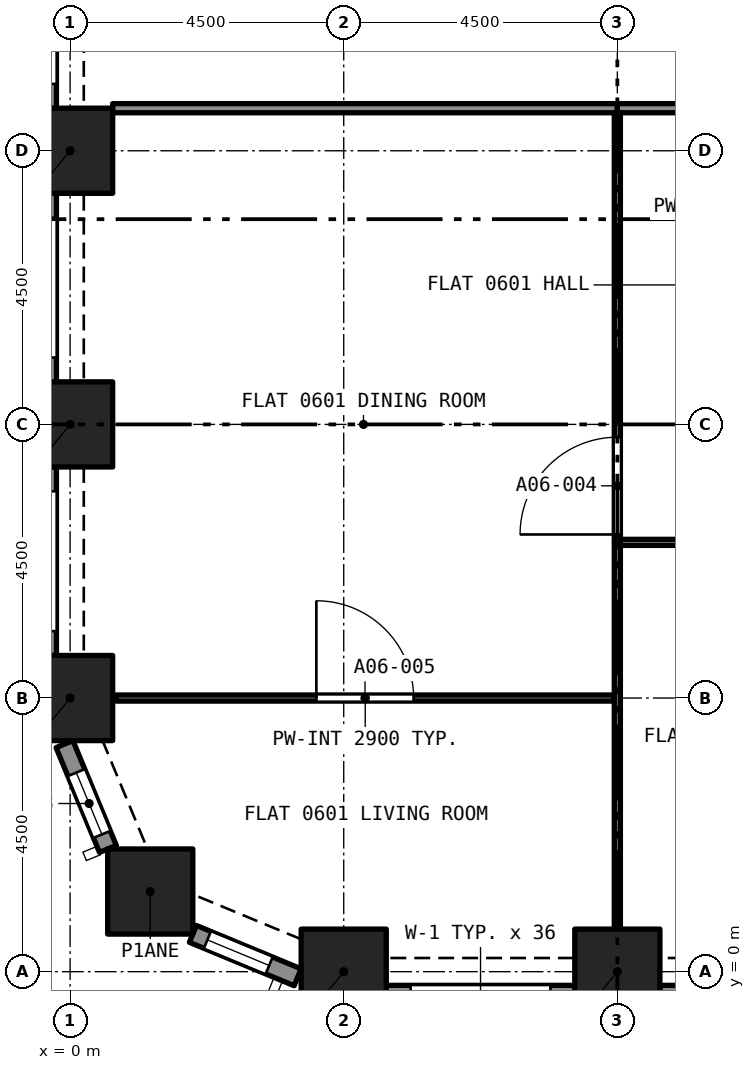
"""IFC4 building model, lengths in metres.
Left out: names, types, materials, properties, quantities, classifications, styles, units other than length and angle.
Written with IfcOpenShell. Run it as: python <this file> out.ifc"""

import sys

from ifc_helpers import new_model, si_unit, direction, frame, frame_2d, origin, origin_2d, place, context, subcontext, project, spatial, rectangle, extrude, element, fill, save


model = new_model("IFC4")
c1 = context("Model", 3, precision=1e-05, world=origin(), true_north=direction((0.0, 1.0)))
c2 = subcontext(c1, "Body", "Model", "MODEL_VIEW")
j1 = project(units=[si_unit("LENGTHUNIT", "METRE"), si_unit("PLANEANGLEUNIT", "RADIAN")], contexts=[c1])
p1 = place(None, origin())
s1 = spatial("IfcSite", under=j1, at=p1, CompositionType="ELEMENT")
p2 = place(p1, origin())
s2 = spatial("IfcBuilding", under=s1, at=p2, CompositionType="ELEMENT")
p3 = place(p2, frame((0.0, 0.0, 30.4)))
s3 = spatial("IfcBuildingStorey", under=s2, at=p3, CompositionType="ELEMENT", Elevation=30.4)
for number, where, z_axis, x_axis in (
    (1, (4.5, 0.0, 0.0), (0.0, 0.0, 1.0), (1.0, 0.0, 0.0)),
    (2, (9.0, 0.0, 0.0), (0.0, 0.0, 1.0), (1.0, 0.0, 0.0)),
    (3, (1.318, 1.318, 0.0), (0.0, 0.0, 1.0), (1.0, 0.0, 0.0)),
    (4, (0.0, 4.5, 0.0), (0.0, 0.0, 1.0), (1.0, 0.0, 0.0)),
    (5, (0.0, 9.0, 0.0), (0.0, 0.0, 1.0), (1.0, 0.0, 0.0)),
    (6, (0.0, 13.5, 0.0), (0.0, 0.0, 1.0), (1.0, 0.0, 0.0)),
):
    element("IfcColumn", number, at=place(p3, frame(where, z_axis=z_axis, x_axis=x_axis)), inside=s3, PredefinedType="COLUMN", context=c2, shape_type="SweptSolid", body=[
        extrude(rectangle(XDim=1.4, YDim=1.4, at=origin_2d()), origin(), (0.0, 0.0, 1.0), 3.2),
    ])
p4 = place(p3, frame((0.622, 2.02, 0.0), z_axis=(0.0, 0.0, 1.0), x_axis=(-0.38262540684, 0.923903565336, 0.0)))
e7 = element("IfcWall", 7, at=p4, inside=s3, PredefinedType="SOLIDWALL", context=c2, shape_type="SweptSolid", body=[
    extrude(rectangle(XDim=1.865, YDim=0.3, at=frame_2d((0.933, 0.0))), origin(), (0.0, 0.0, 1.0), 3.2),
])
p5 = place(p4, frame((0.258, 0.0, 0.45)))
e8 = element("IfcOpeningElement", 8, at=p5, cuts=e7, PredefinedType="OPENING", context=c2, shape_type="SweptSolid", body=[
    extrude(rectangle(XDim=1.1, YDim=1.95, at=frame_2d((0.55, 0.975))), frame((0.0, 0.16, 0.0), z_axis=(0.0, -1.0, 0.0), x_axis=(1.0, 0.0, 0.0)), (0.0, 0.0, 1.0), 0.32),
])
p6 = place(p3, frame((3.743, -0.092, 0.0), z_axis=(0.0, 0.0, 1.0), x_axis=(-0.923857286003, 0.382737135771, 0.0)))
e9 = element("IfcWall", 9, at=p6, inside=s3, PredefinedType="SOLIDWALL", context=c2, shape_type="SweptSolid", body=[
    extrude(rectangle(XDim=1.865, YDim=0.3, at=frame_2d((0.933, 0.0))), origin(), (0.0, 0.0, 1.0), 3.2),
])
p7 = place(p6, frame((0.508, 0.0, 0.45)))
e10 = element("IfcOpeningElement", 10, at=p7, cuts=e9, PredefinedType="OPENING", context=c2, shape_type="SweptSolid", body=[
    extrude(rectangle(XDim=1.1, YDim=1.95, at=frame_2d((0.55, 0.975))), frame((0.0, 0.16, 0.0), z_axis=(0.0, -1.0, 0.0), x_axis=(1.0, 0.0, 0.0)), (0.0, 0.0, 1.0), 0.32),
])
p8 = place(p3, frame((8.3, -0.375, 0.0), z_axis=(0.0, 0.0, 1.0), x_axis=(-1.0, 0.0, 0.0)))
e11 = element("IfcWall", 11, at=p8, inside=s3, PredefinedType="SOLIDWALL", context=c2, shape_type="SweptSolid", body=[
    extrude(rectangle(XDim=3.1, YDim=0.3, at=frame_2d((1.55, 0.0))), origin(), (0.0, 0.0, 1.0), 3.2),
])
p9 = place(p8, frame((0.4, 0.0, 0.45)))
e12 = element("IfcOpeningElement", 12, at=p9, cuts=e11, PredefinedType="OPENING", context=c2, shape_type="SweptSolid", body=[
    extrude(rectangle(XDim=2.3, YDim=1.95, at=frame_2d((1.15, 0.975))), frame((0.0, 0.16, 0.0), z_axis=(0.0, -1.0, 0.0), x_axis=(1.0, 0.0, 0.0)), (0.0, 0.0, 1.0), 0.32),
])
p10 = place(p3, frame((12.8, -0.375, 0.0), z_axis=(0.0, 0.0, 1.0), x_axis=(-1.0, 0.0, 0.0)))
e13 = element("IfcWall", 13, at=p10, inside=s3, PredefinedType="SOLIDWALL", context=c2, shape_type="SweptSolid", body=[
    extrude(rectangle(XDim=3.1, YDim=0.3, at=frame_2d((1.55, 0.0))), origin(), (0.0, 0.0, 1.0), 3.2),
])
p11 = place(p10, frame((0.4, 0.0, 0.45)))
e14 = element("IfcOpeningElement", 14, at=p11, cuts=e13, PredefinedType="OPENING", context=c2, shape_type="SweptSolid", body=[
    extrude(rectangle(XDim=2.3, YDim=1.95, at=frame_2d((1.15, 0.975))), frame((0.0, 0.16, 0.0), z_axis=(0.0, -1.0, 0.0), x_axis=(1.0, 0.0, 0.0)), (0.0, 0.0, 1.0), 0.32),
])
p12 = place(p3, frame((-0.375, 14.2, 0.0), z_axis=(0.0, 0.0, 1.0), x_axis=(0.0, 1.0, 0.0)))
e15 = element("IfcWall", 15, at=p12, inside=s3, PredefinedType="SOLIDWALL", context=c2, shape_type="SweptSolid", body=[
    extrude(rectangle(XDim=3.1, YDim=0.3, at=frame_2d((1.55, 0.0))), origin(), (0.0, 0.0, 1.0), 3.2),
])
p13 = place(p12, frame((0.4, 0.0, 0.45)))
e16 = element("IfcOpeningElement", 16, at=p13, cuts=e15, PredefinedType="OPENING", context=c2, shape_type="SweptSolid", body=[
    extrude(rectangle(XDim=2.3, YDim=1.95, at=frame_2d((1.15, 0.975))), frame((0.0, 0.16, 0.0), z_axis=(0.0, -1.0, 0.0), x_axis=(1.0, 0.0, 0.0)), (0.0, 0.0, 1.0), 0.32),
])
p14 = place(p3, frame((-0.375, 9.7, 0.0), z_axis=(0.0, 0.0, 1.0), x_axis=(0.0, 1.0, 0.0)))
e17 = element("IfcWall", 17, at=p14, inside=s3, PredefinedType="SOLIDWALL", context=c2, shape_type="SweptSolid", body=[
    extrude(rectangle(XDim=3.1, YDim=0.3, at=frame_2d((1.55, 0.0))), origin(), (0.0, 0.0, 1.0), 3.2),
])
p15 = place(p14, frame((0.4, 0.0, 0.45)))
e18 = element("IfcOpeningElement", 18, at=p15, cuts=e17, PredefinedType="OPENING", context=c2, shape_type="SweptSolid", body=[
    extrude(rectangle(XDim=2.3, YDim=1.95, at=frame_2d((1.15, 0.975))), frame((0.0, 0.16, 0.0), z_axis=(0.0, -1.0, 0.0), x_axis=(1.0, 0.0, 0.0)), (0.0, 0.0, 1.0), 0.32),
])
p16 = place(p3, frame((-0.375, 5.2, 0.0), z_axis=(0.0, 0.0, 1.0), x_axis=(0.0, 1.0, 0.0)))
e19 = element("IfcWall", 19, at=p16, inside=s3, PredefinedType="SOLIDWALL", context=c2, shape_type="SweptSolid", body=[
    extrude(rectangle(XDim=3.1, YDim=0.3, at=frame_2d((1.55, 0.0))), origin(), (0.0, 0.0, 1.0), 3.2),
])
p17 = place(p16, frame((0.4, 0.0, 0.45)))
e20 = element("IfcOpeningElement", 20, at=p17, cuts=e19, PredefinedType="OPENING", context=c2, shape_type="SweptSolid", body=[
    extrude(rectangle(XDim=2.3, YDim=1.95, at=frame_2d((1.15, 0.975))), frame((0.0, 0.16, 0.0), z_axis=(0.0, -1.0, 0.0), x_axis=(1.0, 0.0, 0.0)), (0.0, 0.0, 1.0), 0.32),
])
p18 = place(p3, frame((13.5, 7.06, 0.0), z_axis=(0.0, 0.0, 1.0), x_axis=(-1.0, 0.0, 0.0)))
e21 = element("IfcWall", 21, at=p18, inside=s3, PredefinedType="PARTITIONING", context=c2, shape_type="SweptSolid", body=[
    extrude(rectangle(XDim=4.45, YDim=0.1, at=frame_2d((2.225, 0.0))), origin(), (0.0, 0.0, 1.0), 2.9),
])
p19 = place(p18, frame((1.8, 0.0, 0.0)))
e22 = element("IfcOpeningElement", 22, at=p19, cuts=e21, PredefinedType="OPENING", context=c2, shape_type="SweptSolid", body=[
    extrude(rectangle(XDim=0.9, YDim=2.1, at=frame_2d((0.45, 1.05))), frame((0.0, 0.06, 0.0), z_axis=(0.0, -1.0, 0.0), x_axis=(1.0, 0.0, 0.0)), (0.0, 0.0, 1.0), 0.12),
])
p20 = place(p3, frame((9.0, 0.7, 0.0), z_axis=(0.0, 0.0, 1.0), x_axis=(0.0, 1.0, 0.0)))
e23 = element("IfcWall", 23, at=p20, inside=s3, PredefinedType="PARTITIONING", context=c2, shape_type="SweptSolid", body=[
    extrude(rectangle(XDim=6.36, YDim=0.1, at=frame_2d((3.18, 0.0))), origin(), (0.0, 0.0, 1.0), 2.9),
])
p21 = place(p3, frame((9.0, 7.06, 0.0), z_axis=(0.0, 0.0, 1.0), x_axis=(0.0, 1.0, 0.0)))
e24 = element("IfcWall", 24, at=p21, inside=s3, PredefinedType="PARTITIONING", context=c2, shape_type="SweptSolid", body=[
    extrude(rectangle(XDim=7.065, YDim=0.1, at=frame_2d((3.532, 0.0))), origin(), (0.0, 0.0, 1.0), 2.9),
])
p22 = place(p21, frame((0.13, 0.0, 0.0)))
e25 = element("IfcOpeningElement", 25, at=p22, cuts=e24, PredefinedType="OPENING", context=c2, shape_type="SweptSolid", body=[
    extrude(rectangle(XDim=1.6, YDim=2.1, at=frame_2d((0.8, 1.05))), frame((0.0, 0.06, 0.0), z_axis=(0.0, -1.0, 0.0), x_axis=(1.0, 0.0, 0.0)), (0.0, 0.0, 1.0), 0.12),
])
p23 = place(p3, frame((0.758, 4.5, 0.0), z_axis=(0.0, 0.0, 1.0), x_axis=(1.0, 0.0, 0.0)))
e26 = element("IfcWall", 26, at=p23, inside=s3, PredefinedType="PARTITIONING", context=c2, shape_type="SweptSolid", body=[
    extrude(rectangle(XDim=8.192, YDim=0.1, at=frame_2d((4.096, 0.0))), origin(), (0.0, 0.0, 1.0), 2.9),
])
p24 = place(p23, frame((3.292, 0.0, 0.0)))
e27 = element("IfcOpeningElement", 27, at=p24, cuts=e26, PredefinedType="OPENING", context=c2, shape_type="SweptSolid", body=[
    extrude(rectangle(XDim=1.6, YDim=2.1, at=frame_2d((0.8, 1.05))), frame((0.0, 0.06, 0.0), z_axis=(0.0, -1.0, 0.0), x_axis=(1.0, 0.0, 0.0)), (0.0, 0.0, 1.0), 0.12),
])
p25 = place(p3, frame((0.7, 14.2, 0.0), z_axis=(0.0, 0.0, 1.0), x_axis=(1.0, 0.0, 0.0)))
e28 = element("IfcWall", 28, at=p25, inside=s3, PredefinedType="PARTITIONING", context=c2, shape_type="SweptSolid", body=[
    extrude(rectangle(XDim=8.3, YDim=0.15, at=frame_2d((4.15, 0.0))), origin(), (0.0, 0.0, 1.0), 2.9),
])
p26 = place(p3, frame((11.925, 14.2, 0.0), z_axis=(0.0, 0.0, 1.0), x_axis=(-1.0, 0.0, 0.0)))
e29 = element("IfcWall", 29, at=p26, inside=s3, PredefinedType="PARTITIONING", context=c2, shape_type="SweptSolid", body=[
    extrude(rectangle(XDim=2.925, YDim=0.15, at=frame_2d((1.462, 0.0))), origin(), (0.0, 0.0, 1.0), 2.9),
])
p27 = place(p26, frame((0.175, 0.0, 0.0)))
e30 = element("IfcOpeningElement", 30, at=p27, cuts=e29, PredefinedType="OPENING", context=c2, shape_type="SweptSolid", body=[
    extrude(rectangle(XDim=1.0, YDim=2.1, at=frame_2d((0.5, 1.05))), frame((0.0, 0.085, 0.0), z_axis=(0.0, -1.0, 0.0), x_axis=(1.0, 0.0, 0.0)), (0.0, 0.0, 1.0), 0.17),
])
p28 = place(p5, origin())
e31 = element("IfcWindow", 31, at=p28, inside=s3, PartitioningType="SINGLE_PANEL", PredefinedType="WINDOW", context=c2, shape_type="SweptSolid", body=[
    extrude(rectangle(XDim=1.1, YDim=1.95, at=frame_2d((0.55, 0.975))), frame((0.0, 0.03, 0.0), z_axis=(0.0, -1.0, 0.0), x_axis=(1.0, 0.0, 0.0)), (0.0, 0.0, 1.0), 0.06),
])
fill(e8, e31)
p29 = place(p7, origin())
e32 = element("IfcWindow", 32, at=p29, inside=s3, PartitioningType="SINGLE_PANEL", PredefinedType="WINDOW", context=c2, shape_type="SweptSolid", body=[
    extrude(rectangle(XDim=1.1, YDim=1.95, at=frame_2d((0.55, 0.975))), frame((0.0, 0.03, 0.0), z_axis=(0.0, -1.0, 0.0), x_axis=(1.0, 0.0, 0.0)), (0.0, 0.0, 1.0), 0.06),
])
fill(e10, e32)
p30 = place(p22, origin())
e33 = element("IfcDoor", 33, at=p30, inside=s3, OperationType="SINGLE_SWING_LEFT", PredefinedType="DOOR", context=c2, shape_type="SweptSolid", body=[
    extrude(rectangle(XDim=1.6, YDim=2.1, at=frame_2d((0.8, 1.05))), frame((0.0, 0.025, 0.0), z_axis=(0.0, -1.0, 0.0), x_axis=(1.0, 0.0, 0.0)), (0.0, 0.0, 1.0), 0.05),
])
fill(e25, e33)
p31 = place(p24, origin())
e34 = element("IfcDoor", 34, at=p31, inside=s3, OperationType="SINGLE_SWING_LEFT", PredefinedType="DOOR", context=c2, shape_type="SweptSolid", body=[
    extrude(rectangle(XDim=1.6, YDim=2.1, at=frame_2d((0.8, 1.05))), frame((0.0, 0.025, 0.0), z_axis=(0.0, -1.0, 0.0), x_axis=(1.0, 0.0, 0.0)), (0.0, 0.0, 1.0), 0.05),
])
fill(e27, e34)
save(model, sys.argv[1])
